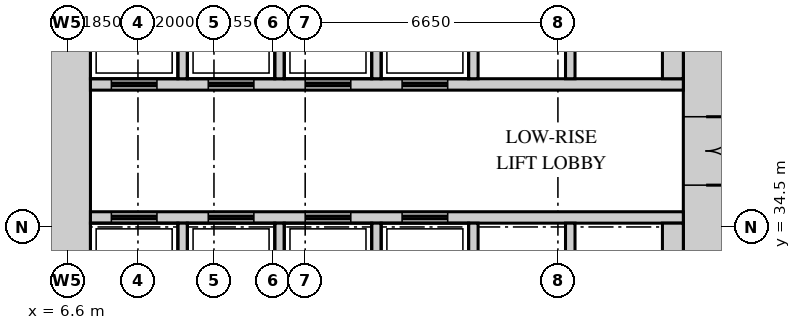
"""IFC4 building model, lengths in metres.
Left out: names, types, materials, properties, quantities, classifications, styles, units other than length and angle.
Written with IfcOpenShell. Run it as: python <this file> out.ifc"""

import sys

from ifc_helpers import new_model, si_unit, direction, frame, frame_2d, origin, place, context, subcontext, project, spatial, rectangle, extrude, source, transform, mapped, element, fill, save


model = new_model("IFC4")
c1 = context("Model", 3, precision=1e-05, world=origin(), true_north=direction((0.0, 1.0)))
c2 = subcontext(c1, "Body", "Model", "MODEL_VIEW")
j1 = project(units=[si_unit("LENGTHUNIT", "METRE"), si_unit("PLANEANGLEUNIT", "RADIAN")], contexts=[c1])
p1 = place(None, origin())
s1 = spatial("IfcSite", under=j1, at=p1, CompositionType="ELEMENT")
p2 = place(p1, origin())
s2 = spatial("IfcBuilding", under=s1, at=p2, CompositionType="ELEMENT")
p3 = place(p2, frame((0.0, 0.0, 13.0)))
s3 = spatial("IfcBuildingStorey", under=s2, at=p3, CompositionType="ELEMENT", Elevation=13.0)
m1 = source(origin(), c2, "Body", "SweptSolid", [
    extrude(rectangle(XDim=27.6, YDim=1.2, at=frame_2d((13.8, 0.0))), origin(), (0.0, 0.0, 1.0), 5.2),
])
p4 = place(p3, frame((23.4, 13.2, 0.0), z_axis=(0.0, 0.0, 1.0), x_axis=(0.0, 1.0, 0.0)))
e1 = element("IfcWall", 1, at=p4, inside=s3, PredefinedType="SHEAR", context=c2, shape_type="MappedRepresentation", body=[
    mapped(m1, transform((0.0, 0.0, 0.0))),
])
m2 = source(origin(), c2, "Body", "SweptSolid", [
    extrude(rectangle(XDim=1.8, YDim=2.1, at=frame_2d((0.9, 1.05))), frame((0.0, 0.61, 0.0), z_axis=(0.0, -1.0, 0.0), x_axis=(1.0, 0.0, 0.0)), (0.0, 0.0, 1.0), 1.22),
])
p5 = place(p4, frame((22.4, 0.0, 0.0)))
e2 = element("IfcOpeningElement", 2, at=p5, cuts=e1, PredefinedType="OPENING", context=c2, shape_type="MappedRepresentation", body=[
    mapped(m2, transform((0.0, 0.0, 0.0))),
])
m3 = source(origin(), c2, "Body", "SweptSolid", [
    extrude(rectangle(XDim=1.2, YDim=2.1, at=frame_2d((0.6, 1.05))), frame((0.0, 0.61, 0.0), z_axis=(0.0, -1.0, 0.0), x_axis=(1.0, 0.0, 0.0)), (0.0, 0.0, 1.0), 1.22),
])
p6 = place(p4, frame((12.15, 0.0, 0.0)))
e3 = element("IfcOpeningElement", 3, at=p6, cuts=e1, PredefinedType="OPENING", context=c2, shape_type="MappedRepresentation", body=[
    mapped(m3, transform((0.0, 0.0, 0.0))),
])
m4 = source(origin(), c2, "Body", "SweptSolid", [
    extrude(rectangle(XDim=0.9, YDim=2.1, at=frame_2d((0.45, 1.05))), frame((0.0, 0.61, 0.0), z_axis=(0.0, -1.0, 0.0), x_axis=(1.0, 0.0, 0.0)), (0.0, 0.0, 1.0), 1.22),
])
p7 = place(p4, frame((4.4, 0.0, 0.0)))
e4 = element("IfcOpeningElement", 4, at=p7, cuts=e1, PredefinedType="OPENING", context=c2, shape_type="MappedRepresentation", body=[
    mapped(m4, transform((0.0, 0.0, 0.0))),
])
p8 = place(p3, frame((6.6, 13.2, 0.0), z_axis=(0.0, 0.0, 1.0), x_axis=(0.0, 1.0, 0.0)))
e5 = element("IfcWall", 5, at=p8, inside=s3, PredefinedType="SHEAR", context=c2, shape_type="MappedRepresentation", body=[
    mapped(m1, transform((0.0, 0.0, 0.0))),
])
m5 = source(origin(), c2, "Body", "SweptSolid", [
    extrude(rectangle(XDim=15.6, YDim=0.3, at=frame_2d((7.8, 0.0))), origin(), (0.0, 0.0, 1.0), 5.2),
])
p9 = place(p3, frame((7.2, 38.25, 0.0), z_axis=(0.0, 0.0, 1.0), x_axis=(1.0, 0.0, 0.0)))
e6 = element("IfcWall", 6, at=p9, inside=s3, PredefinedType="STANDARD", context=c2, shape_type="MappedRepresentation", body=[
    mapped(m5, transform((0.0, 0.0, 0.0))),
])
m6 = source(origin(), c2, "Body", "SweptSolid", [
    extrude(rectangle(XDim=1.2, YDim=2.1, at=frame_2d((0.6, 1.05))), frame((0.0, 0.16, 0.0), z_axis=(0.0, -1.0, 0.0), x_axis=(1.0, 0.0, 0.0)), (0.0, 0.0, 1.0), 0.32),
])
p10 = place(p9, frame((0.55, 0.0, 0.0)))
e7 = element("IfcOpeningElement", 7, at=p10, cuts=e6, PredefinedType="OPENING", context=c2, shape_type="MappedRepresentation", body=[
    mapped(m6, transform((0.0, 0.0, 0.0))),
])
p11 = place(p9, frame((3.1, 0.0, 0.0)))
e8 = element("IfcOpeningElement", 8, at=p11, cuts=e6, PredefinedType="OPENING", context=c2, shape_type="MappedRepresentation", body=[
    mapped(m6, transform((0.0, 0.0, 0.0))),
])
p12 = place(p9, frame((5.65, 0.0, 0.0)))
e9 = element("IfcOpeningElement", 9, at=p12, cuts=e6, PredefinedType="OPENING", context=c2, shape_type="MappedRepresentation", body=[
    mapped(m6, transform((0.0, 0.0, 0.0))),
])
p13 = place(p9, frame((8.2, 0.0, 0.0)))
e10 = element("IfcOpeningElement", 10, at=p13, cuts=e6, PredefinedType="OPENING", context=c2, shape_type="MappedRepresentation", body=[
    mapped(m6, transform((0.0, 0.0, 0.0))),
])
p14 = place(p3, frame((7.2, 34.75, 0.0), z_axis=(0.0, 0.0, 1.0), x_axis=(1.0, 0.0, 0.0)))
e11 = element("IfcWall", 11, at=p14, inside=s3, PredefinedType="STANDARD", context=c2, shape_type="MappedRepresentation", body=[
    mapped(m5, transform((0.0, 0.0, 0.0))),
])
p15 = place(p14, frame((0.55, 0.0, 0.0)))
e12 = element("IfcOpeningElement", 12, at=p15, cuts=e11, PredefinedType="OPENING", context=c2, shape_type="MappedRepresentation", body=[
    mapped(m6, transform((0.0, 0.0, 0.0))),
])
p16 = place(p14, frame((3.1, 0.0, 0.0)))
e13 = element("IfcOpeningElement", 13, at=p16, cuts=e11, PredefinedType="OPENING", context=c2, shape_type="MappedRepresentation", body=[
    mapped(m6, transform((0.0, 0.0, 0.0))),
])
p17 = place(p14, frame((5.65, 0.0, 0.0)))
e14 = element("IfcOpeningElement", 14, at=p17, cuts=e11, PredefinedType="OPENING", context=c2, shape_type="MappedRepresentation", body=[
    mapped(m6, transform((0.0, 0.0, 0.0))),
])
p18 = place(p14, frame((8.2, 0.0, 0.0)))
e15 = element("IfcOpeningElement", 15, at=p18, cuts=e11, PredefinedType="OPENING", context=c2, shape_type="MappedRepresentation", body=[
    mapped(m6, transform((0.0, 0.0, 0.0))),
])
m7 = source(origin(), c2, "Body", "SweptSolid", [
    extrude(rectangle(XDim=2.4, YDim=0.25, at=frame_2d((1.2, 0.0))), origin(), (0.0, 0.0, 1.0), 5.2),
])
for number, where, z_axis, x_axis in (
    (16, (9.625, 38.4, 0.0), (0.0, 0.0, 1.0), (0.0, 1.0, 0.0)),
    (17, (12.175, 38.4, 0.0), (0.0, 0.0, 1.0), (0.0, 1.0, 0.0)),
    (18, (14.725, 38.4, 0.0), (0.0, 0.0, 1.0), (0.0, 1.0, 0.0)),
    (19, (17.275, 38.4, 0.0), (0.0, 0.0, 1.0), (0.0, 1.0, 0.0)),
    (20, (19.825, 38.4, 0.0), (0.0, 0.0, 1.0), (0.0, 1.0, 0.0)),
):
    element("IfcWall", number, at=place(p3, frame(where, z_axis=z_axis, x_axis=x_axis)), inside=s3, PredefinedType="STANDARD", context=c2, shape_type="MappedRepresentation", body=[
        mapped(m7, transform((0.0, 0.0, 0.0))),
    ])
m8 = source(origin(), c2, "Body", "SweptSolid", [
    extrude(rectangle(XDim=2.4, YDim=0.55, at=frame_2d((1.2, 0.0))), origin(), (0.0, 0.0, 1.0), 5.2),
])
p19 = place(p3, frame((22.525, 38.4, 0.0), z_axis=(0.0, 0.0, 1.0), x_axis=(0.0, 1.0, 0.0)))
e21 = element("IfcWall", 21, at=p19, inside=s3, PredefinedType="STANDARD", context=c2, shape_type="MappedRepresentation", body=[
    mapped(m8, transform((0.0, 0.0, 0.0))),
])
for number, where, z_axis, x_axis in (
    (22, (9.625, 32.2, 0.0), (0.0, 0.0, 1.0), (0.0, 1.0, 0.0)),
    (23, (12.175, 32.2, 0.0), (0.0, 0.0, 1.0), (0.0, 1.0, 0.0)),
    (24, (14.725, 32.2, 0.0), (0.0, 0.0, 1.0), (0.0, 1.0, 0.0)),
    (25, (17.275, 32.2, 0.0), (0.0, 0.0, 1.0), (0.0, 1.0, 0.0)),
    (26, (19.825, 32.2, 0.0), (0.0, 0.0, 1.0), (0.0, 1.0, 0.0)),
):
    element("IfcWall", number, at=place(p3, frame(where, z_axis=z_axis, x_axis=x_axis)), inside=s3, PredefinedType="STANDARD", context=c2, shape_type="MappedRepresentation", body=[
        mapped(m7, transform((0.0, 0.0, 0.0))),
    ])
p20 = place(p3, frame((22.525, 32.2, 0.0), z_axis=(0.0, 0.0, 1.0), x_axis=(0.0, 1.0, 0.0)))
e27 = element("IfcWall", 27, at=p20, inside=s3, PredefinedType="STANDARD", context=c2, shape_type="MappedRepresentation", body=[
    mapped(m8, transform((0.0, 0.0, 0.0))),
])
m9 = source(origin(), c2, "Body", "SweptSolid", [
    extrude(rectangle(XDim=1.8, YDim=2.1, at=frame_2d((0.9, 1.05))), frame((0.0, 0.55, 0.0), z_axis=(0.0, -1.0, 0.0), x_axis=(1.0, 0.0, 0.0)), (0.0, 0.0, 1.0), 1.1),
])
p21 = place(p5, origin())
e28 = element("IfcDoor", 28, at=p21, inside=s3, OperationType="DOUBLE_DOOR_SINGLE_SWING", PredefinedType="DOOR", context=c2, shape_type="MappedRepresentation", body=[
    mapped(m9, transform((0.0, 0.0, 0.0))),
])
fill(e2, e28)
m10 = source(origin(), c2, "Body", "SweptSolid", [
    extrude(rectangle(XDim=1.2, YDim=2.1, at=frame_2d((0.6, 1.05))), frame((0.0, 0.025, 0.0), z_axis=(0.0, -1.0, 0.0), x_axis=(1.0, 0.0, 0.0)), (0.0, 0.0, 1.0), 0.05),
])
p22 = place(p15, origin())
e29 = element("IfcDoor", 29, at=p22, inside=s3, OperationType="DOUBLE_DOOR_SLIDING", PredefinedType="DOOR", context=c2, shape_type="MappedRepresentation", body=[
    mapped(m10, transform((0.0, 0.0, 0.0))),
])
fill(e12, e29)
p23 = place(p16, origin())
e30 = element("IfcDoor", 30, at=p23, inside=s3, OperationType="DOUBLE_DOOR_SLIDING", PredefinedType="DOOR", context=c2, shape_type="MappedRepresentation", body=[
    mapped(m10, transform((0.0, 0.0, 0.0))),
])
fill(e13, e30)
p24 = place(p17, origin())
e31 = element("IfcDoor", 31, at=p24, inside=s3, OperationType="DOUBLE_DOOR_SLIDING", PredefinedType="DOOR", context=c2, shape_type="MappedRepresentation", body=[
    mapped(m10, transform((0.0, 0.0, 0.0))),
])
fill(e14, e31)
p25 = place(p18, origin())
e32 = element("IfcDoor", 32, at=p25, inside=s3, OperationType="DOUBLE_DOOR_SLIDING", PredefinedType="DOOR", context=c2, shape_type="MappedRepresentation", body=[
    mapped(m10, transform((0.0, 0.0, 0.0))),
])
fill(e15, e32)
p26 = place(p10, origin())
e33 = element("IfcDoor", 33, at=p26, inside=s3, OperationType="DOUBLE_DOOR_SLIDING", PredefinedType="DOOR", context=c2, shape_type="MappedRepresentation", body=[
    mapped(m10, transform((0.0, 0.0, 0.0))),
])
fill(e7, e33)
p27 = place(p11, origin())
e34 = element("IfcDoor", 34, at=p27, inside=s3, OperationType="DOUBLE_DOOR_SLIDING", PredefinedType="DOOR", context=c2, shape_type="MappedRepresentation", body=[
    mapped(m10, transform((0.0, 0.0, 0.0))),
])
fill(e8, e34)
p28 = place(p12, origin())
e35 = element("IfcDoor", 35, at=p28, inside=s3, OperationType="DOUBLE_DOOR_SLIDING", PredefinedType="DOOR", context=c2, shape_type="MappedRepresentation", body=[
    mapped(m10, transform((0.0, 0.0, 0.0))),
])
fill(e9, e35)
p29 = place(p13, origin())
e36 = element("IfcDoor", 36, at=p29, inside=s3, OperationType="DOUBLE_DOOR_SLIDING", PredefinedType="DOOR", context=c2, shape_type="MappedRepresentation", body=[
    mapped(m10, transform((0.0, 0.0, 0.0))),
])
fill(e10, e36)
save(model, sys.argv[1])
